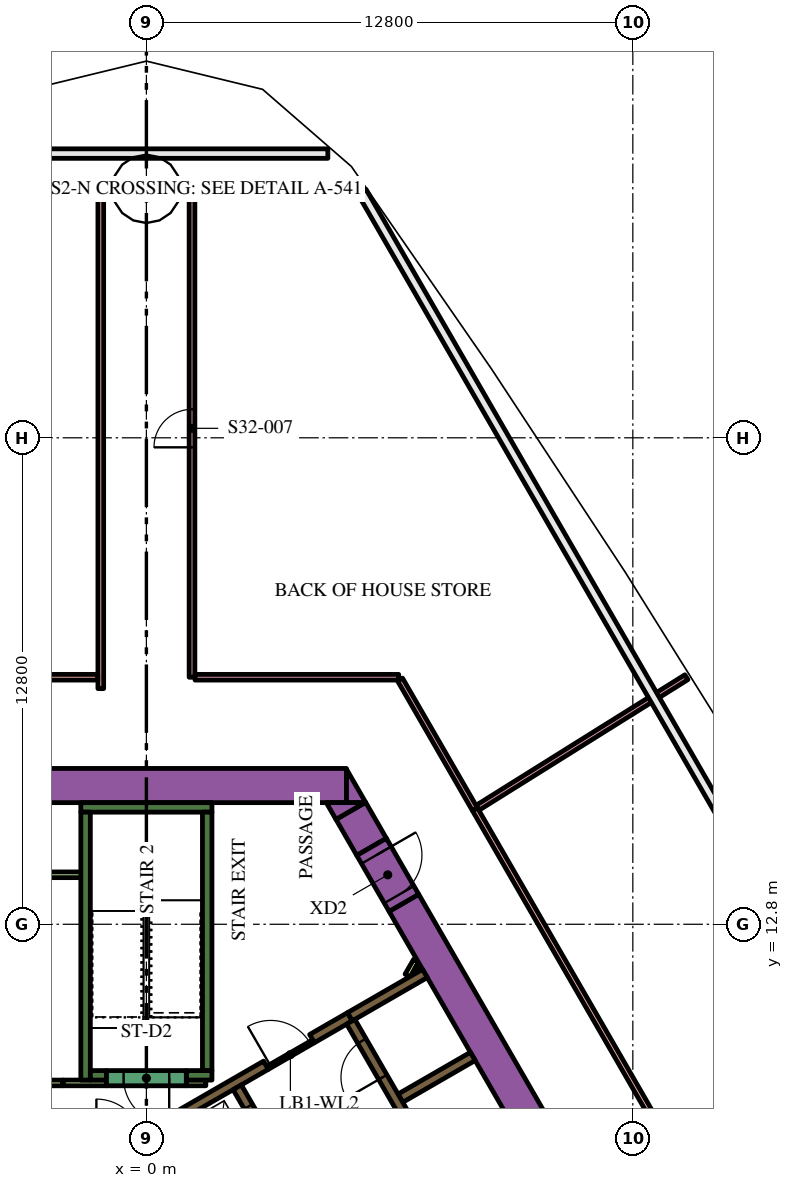
"""IFC4 building model, lengths in metres.
Left out: names, types, materials, properties, quantities, classifications, styles, units other than length and angle.
Written with IfcOpenShell. Run it as: python <this file> out.ifc"""

import sys

from ifc_helpers import new_model, si_unit, direction, frame, frame_2d, origin, place, context, subcontext, project, spatial, polyline, rectangle, outline, extrude, element, fill, save


model = new_model("IFC4")
c1 = context("Model", 3, precision=1e-05, world=origin(), true_north=direction((0.0, 1.0)))
c2 = subcontext(c1, "Body", "Model", "MODEL_VIEW")
j1 = project(units=[si_unit("LENGTHUNIT", "METRE"), si_unit("PLANEANGLEUNIT", "RADIAN")], contexts=[c1])
p1 = place(None, origin())
s1 = spatial("IfcSite", under=j1, at=p1, CompositionType="ELEMENT")
p2 = place(p1, origin())
s2 = spatial("IfcBuilding", under=s1, at=p2, CompositionType="ELEMENT")
p3 = place(p2, frame((0.0, 0.0, 134.4)))
s3 = spatial("IfcBuildingStorey", under=s2, at=p3, CompositionType="ELEMENT", Elevation=134.4)
p4 = place(p3, frame((6.776, 13.364, 0.0), z_axis=(0.0, 0.0, 1.0), x_axis=(0.500004177138, -0.8660229921, 0.0)))
e1 = element("IfcWall", 1, at=p4, inside=s3, PredefinedType="SOLIDWALL", context=c2, shape_type="SweptSolid", body=[
    extrude(rectangle(XDim=20.204, YDim=0.9, at=frame_2d((10.102, 0.0))), origin(), (0.0, 0.0, 1.0), 7.2),
])
p5 = place(p3, frame((-4.224, 16.45, 0.0), z_axis=(0.0, 0.0, 1.0), x_axis=(1.0, 0.0, 0.0)))
e2 = element("IfcWall", 2, at=p5, inside=s3, PredefinedType="SOLIDWALL", context=c2, shape_type="SweptSolid", body=[
    extrude(rectangle(XDim=9.488, YDim=0.9, at=frame_2d((4.744, 0.0))), origin(), (0.0, 0.0, 1.0), 7.2),
])
p6 = place(p3, origin())
e3 = element("IfcWall", 3, at=p6, inside=s3, PredefinedType="SOLIDWALL", context=c2, shape_type="SweptSolid", body=[
    extrude(outline(polyline([(5.265, 16.0), (5.265, 16.88), (5.773, 16.0), (5.265, 16.0)])), origin(), (0.0, 0.0, 1.0), 7.2),
])
p7 = place(p3, frame((5.926, 14.836, 0.0), z_axis=(0.0, 0.0, 1.0), x_axis=(-0.500076735116, 0.865981096212, 0.0)))
e4 = element("IfcWall", 4, at=p7, inside=s3, PredefinedType="SOLIDWALL", context=c2, shape_type="SweptSolid", body=[
    extrude(rectangle(XDim=1.094, YDim=0.9, at=frame_2d((0.547, 0.0))), origin(), (0.0, 0.0, 1.0), 7.2),
])
e5 = element("IfcWall", 5, at=p6, inside=s3, PredefinedType="SOLIDWALL", context=c2, shape_type="SweptSolid", body=[
    extrude(outline(polyline([(4.734, 16.0), (5.75, 16.0), (4.988, 15.56), (4.734, 16.0)])), origin(), (0.0, 0.0, 1.0), 7.2),
])
p8 = place(p3, frame((-1.725, 15.875, 0.0), z_axis=(0.0, 0.0, 1.0), x_axis=(1.0, 0.0, 0.0)))
e6 = element("IfcWall", 6, at=p8, inside=s3, PredefinedType="SOLIDWALL", context=c2, shape_type="SweptSolid", body=[
    extrude(rectangle(XDim=3.45, YDim=0.25, at=frame_2d((1.725, 0.0))), origin(), (0.0, 0.0, 1.0), 7.2),
])
p9 = place(p3, frame((1.6, 8.95, 0.0), z_axis=(0.0, 0.0, 1.0), x_axis=(0.0, 1.0, 0.0)))
e7 = element("IfcWall", 7, at=p9, inside=s3, PredefinedType="SOLIDWALL", context=c2, shape_type="SweptSolid", body=[
    extrude(rectangle(XDim=6.8, YDim=0.25, at=frame_2d((3.4, 0.0))), origin(), (0.0, 0.0, 1.0), 7.2),
])
p10 = place(p3, frame((1.05, 8.825, 0.0), z_axis=(0.0, 0.0, 1.0), x_axis=(1.0, 0.0, 0.0)))
e8 = element("IfcWall", 8, at=p10, inside=s3, PredefinedType="SOLIDWALL", context=c2, shape_type="SweptSolid", body=[
    extrude(rectangle(XDim=0.675, YDim=0.25, at=frame_2d((0.337, 0.0))), origin(), (0.0, 0.0, 1.0), 7.2),
])
p11 = place(p3, frame((-1.6, 8.7, 0.0), z_axis=(0.0, 0.0, 1.0), x_axis=(0.0, 1.0, 0.0)))
e9 = element("IfcWall", 9, at=p11, inside=s3, PredefinedType="SOLIDWALL", context=c2, shape_type="SweptSolid", body=[
    extrude(rectangle(XDim=7.05, YDim=0.25, at=frame_2d((3.525, 0.0))), origin(), (0.0, 0.0, 1.0), 7.2),
])
p12 = place(p3, frame((-1.475, 8.825, 0.0), z_axis=(0.0, 0.0, 1.0), x_axis=(1.0, 0.0, 0.0)))
e10 = element("IfcWall", 10, at=p12, inside=s3, PredefinedType="SOLIDWALL", context=c2, shape_type="SweptSolid", body=[
    extrude(rectangle(XDim=0.425, YDim=0.25, at=frame_2d((0.212, 0.0))), origin(), (0.0, 0.0, 1.0), 7.2),
])
p13 = place(p3, frame((4.358, 9.791, 0.0), z_axis=(0.0, 0.0, 1.0), x_axis=(0.866079547155, 0.499906209203, 0.0)))
e11 = element("IfcWall", 11, at=p13, inside=s3, PredefinedType="SOLIDWALL", context=c2, shape_type="SweptSolid", body=[
    extrude(rectangle(XDim=1.15, YDim=0.25, at=frame_2d((0.575, 0.0))), origin(), (0.0, 0.0, 1.0), 7.2),
])
p14 = place(p3, frame((5.356, 10.367, 0.0), z_axis=(0.0, 0.0, 1.0), x_axis=(0.865978535641, 0.50008116922, 0.0)))
e12 = element("IfcWall", 12, at=p14, inside=s3, PredefinedType="SOLIDWALL", context=c2, shape_type="SweptSolid", body=[
    extrude(rectangle(XDim=2.278, YDim=0.25, at=frame_2d((1.139, 0.0))), origin(), (0.0, 0.0, 1.0), 7.2),
])
p15 = place(p3, frame((0.314, 7.456, 0.0), z_axis=(0.0, 0.0, 1.0), x_axis=(0.866013897511, 0.50001992892, 0.0)))
e13 = element("IfcWall", 13, at=p15, inside=s3, PredefinedType="SOLIDWALL", context=c2, shape_type="SweptSolid", body=[
    extrude(rectangle(XDim=3.268, YDim=0.25, at=frame_2d((1.634, 0.0))), origin(), (0.0, 0.0, 1.0), 7.2),
])
p16 = place(p3, frame((6.684, 8.224, 0.0), z_axis=(0.0, 0.0, 1.0), x_axis=(0.86605622881, 0.499946605688, 0.0)))
e14 = element("IfcWall", 14, at=p16, inside=s3, PredefinedType="SOLIDWALL", context=c2, shape_type="SweptSolid", body=[
    extrude(rectangle(XDim=2.2, YDim=0.25, at=frame_2d((1.1, 0.0))), origin(), (0.0, 0.0, 1.0), 7.2),
])
p17 = place(p3, frame((-2.196, 8.625, 0.0), z_axis=(0.0, 0.0, 1.0), x_axis=(1.0, 0.0, 0.0)))
e15 = element("IfcWall", 15, at=p17, inside=s3, PredefinedType="PARTITIONING", context=c2, shape_type="SweptSolid", body=[
    extrude(rectangle(XDim=1.146, YDim=0.15, at=frame_2d((0.573, 0.0))), origin(), (0.0, 0.0, 1.0), 6.15),
])
p18 = place(p3, frame((1.05, 8.625, 0.0), z_axis=(0.0, 0.0, 1.0), x_axis=(1.0, 0.0, 0.0)))
e16 = element("IfcWall", 16, at=p18, inside=s3, PredefinedType="PARTITIONING", context=c2, shape_type="SweptSolid", body=[
    extrude(rectangle(XDim=0.514, YDim=0.15, at=frame_2d((0.257, 0.0))), origin(), (0.0, 0.0, 1.0), 6.15),
])
p19 = place(p3, frame((6.872, 11.45, 0.0), z_axis=(0.0, 0.0, 1.0), x_axis=(0.499846793097, 0.866113839764, 0.0)))
e17 = element("IfcWall", 17, at=p19, inside=s3, PredefinedType="PARTITIONING", context=c2, shape_type="SweptSolid", body=[
    extrude(rectangle(XDim=0.453, YDim=0.15, at=frame_2d((0.227, 0.0))), origin(), (0.0, 0.0, 1.0), 6.15),
])
p20 = place(p3, frame((7.131, 11.6, 0.0), z_axis=(0.0, 0.0, 1.0), x_axis=(0.498600033135, 0.866832167699, 0.0)))
e18 = element("IfcWall", 18, at=p20, inside=s3, PredefinedType="PARTITIONING", context=c2, shape_type="SweptSolid", body=[
    extrude(rectangle(XDim=0.107, YDim=0.15, at=frame_2d((0.053, 0.0))), origin(), (0.0, 0.0, 1.0), 6.15),
])
p21 = place(p3, frame((-2.871, 14.102, 0.0), z_axis=(0.0, 0.0, 1.0), x_axis=(1.0, 0.0, 0.0)))
e19 = element("IfcWall", 19, at=p21, inside=s3, PredefinedType="PARTITIONING", context=c2, shape_type="SweptSolid", body=[
    extrude(rectangle(XDim=1.196, YDim=0.15, at=frame_2d((0.598, 0.0))), origin(), (0.0, 0.0, 1.0), 6.15),
])
p22 = place(p3, frame((11.553, -0.46, 0.0), z_axis=(0.0, 0.0, 1.0), x_axis=(-0.500006514828, 0.866021642414, 0.0)))
e20 = element("IfcWall", 20, at=p22, inside=s3, PredefinedType="SOLIDWALL", context=c2, shape_type="SweptSolid", body=[
    extrude(rectangle(XDim=12.35, YDim=0.25, at=frame_2d((6.175, 0.0))), origin(), (0.0, 0.0, 1.0), 7.2),
])
p23 = place(p22, frame((0.585, 0.0, 0.0)))
e21 = element("IfcOpeningElement", 21, at=p23, cuts=e20, PredefinedType="OPENING", context=c2, shape_type="SweptSolid", body=[
    extrude(rectangle(XDim=1.1, YDim=2.1, at=frame_2d((0.55, 1.05))), frame((0.0, 0.135, 0.0), z_axis=(0.0, -1.0, 0.0), x_axis=(1.0, 0.0, 0.0)), (0.0, 0.0, 1.0), 0.27),
])
p24 = place(p22, frame((3.105, 0.0, 0.0)))
e22 = element("IfcOpeningElement", 22, at=p24, cuts=e20, PredefinedType="OPENING", context=c2, shape_type="SweptSolid", body=[
    extrude(rectangle(XDim=1.1, YDim=2.1, at=frame_2d((0.55, 1.05))), frame((0.0, 0.135, 0.0), z_axis=(0.0, -1.0, 0.0), x_axis=(1.0, 0.0, 0.0)), (0.0, 0.0, 1.0), 0.27),
])
p25 = place(p22, frame((5.625, 0.0, 0.0)))
e23 = element("IfcOpeningElement", 23, at=p25, cuts=e20, PredefinedType="OPENING", context=c2, shape_type="SweptSolid", body=[
    extrude(rectangle(XDim=1.1, YDim=2.1, at=frame_2d((0.55, 1.05))), frame((0.0, 0.135, 0.0), z_axis=(0.0, -1.0, 0.0), x_axis=(1.0, 0.0, 0.0)), (0.0, 0.0, 1.0), 0.27),
])
p26 = place(p22, frame((8.145, 0.0, 0.0)))
e24 = element("IfcOpeningElement", 24, at=p26, cuts=e20, PredefinedType="OPENING", context=c2, shape_type="SweptSolid", body=[
    extrude(rectangle(XDim=1.1, YDim=2.1, at=frame_2d((0.55, 1.05))), frame((0.0, 0.135, 0.0), z_axis=(0.0, -1.0, 0.0), x_axis=(1.0, 0.0, 0.0)), (0.0, 0.0, 1.0), 0.27),
])
p27 = place(p22, frame((10.665, 0.0, 0.0)))
e25 = element("IfcOpeningElement", 25, at=p27, cuts=e20, PredefinedType="OPENING", context=c2, shape_type="SweptSolid", body=[
    extrude(rectangle(XDim=1.1, YDim=2.1, at=frame_2d((0.55, 1.05))), frame((0.0, 0.135, 0.0), z_axis=(0.0, -1.0, 0.0), x_axis=(1.0, 0.0, 0.0)), (0.0, 0.0, 1.0), 0.27),
])
p28 = place(p3, frame((8.565, -2.185, 0.0), z_axis=(0.0, 0.0, 1.0), x_axis=(-0.499997954832, 0.866026584559, 0.0)))
e26 = element("IfcWall", 26, at=p28, inside=s3, PredefinedType="SOLIDWALL", context=c2, shape_type="SweptSolid", body=[
    extrude(rectangle(XDim=12.35, YDim=0.25, at=frame_2d((6.175, 0.0))), origin(), (0.0, 0.0, 1.0), 7.2),
])
p29 = place(p28, frame((0.585, 0.0, 0.0)))
e27 = element("IfcOpeningElement", 27, at=p29, cuts=e26, PredefinedType="OPENING", context=c2, shape_type="SweptSolid", body=[
    extrude(rectangle(XDim=1.1, YDim=2.1, at=frame_2d((0.55, 1.05))), frame((0.0, 0.135, 0.0), z_axis=(0.0, -1.0, 0.0), x_axis=(1.0, 0.0, 0.0)), (0.0, 0.0, 1.0), 0.27),
])
p30 = place(p28, frame((3.105, 0.0, 0.0)))
e28 = element("IfcOpeningElement", 28, at=p30, cuts=e26, PredefinedType="OPENING", context=c2, shape_type="SweptSolid", body=[
    extrude(rectangle(XDim=1.1, YDim=2.1, at=frame_2d((0.55, 1.05))), frame((0.0, 0.135, 0.0), z_axis=(0.0, -1.0, 0.0), x_axis=(1.0, 0.0, 0.0)), (0.0, 0.0, 1.0), 0.27),
])
p31 = place(p28, frame((5.625, 0.0, 0.0)))
e29 = element("IfcOpeningElement", 29, at=p31, cuts=e26, PredefinedType="OPENING", context=c2, shape_type="SweptSolid", body=[
    extrude(rectangle(XDim=1.1, YDim=2.1, at=frame_2d((0.55, 1.05))), frame((0.0, 0.135, 0.0), z_axis=(0.0, -1.0, 0.0), x_axis=(1.0, 0.0, 0.0)), (0.0, 0.0, 1.0), 0.27),
])
p32 = place(p28, frame((8.145, 0.0, 0.0)))
e30 = element("IfcOpeningElement", 30, at=p32, cuts=e26, PredefinedType="OPENING", context=c2, shape_type="SweptSolid", body=[
    extrude(rectangle(XDim=1.1, YDim=2.1, at=frame_2d((0.55, 1.05))), frame((0.0, 0.135, 0.0), z_axis=(0.0, -1.0, 0.0), x_axis=(1.0, 0.0, 0.0)), (0.0, 0.0, 1.0), 0.27),
])
p33 = place(p28, frame((10.665, 0.0, 0.0)))
e31 = element("IfcOpeningElement", 31, at=p33, cuts=e26, PredefinedType="OPENING", context=c2, shape_type="SweptSolid", body=[
    extrude(rectangle(XDim=1.1, YDim=2.1, at=frame_2d((0.55, 1.05))), frame((0.0, 0.135, 0.0), z_axis=(0.0, -1.0, 0.0), x_axis=(1.0, 0.0, 0.0)), (0.0, 0.0, 1.0), 0.27),
])
p34 = place(p3, frame((1.05, 8.75, 0.0), z_axis=(0.0, 0.0, 1.0), x_axis=(-1.0, 0.0, 0.0)))
e32 = element("IfcWall", 32, at=p34, inside=s3, PredefinedType="SOLIDWALL", context=c2, shape_type="SweptSolid", body=[
    extrude(rectangle(XDim=2.1, YDim=0.4, at=frame_2d((1.05, 0.0))), origin(), (0.0, 0.0, 1.0), 7.2),
])
p35 = place(p34, frame((0.45, 0.0, 0.0)))
e33 = element("IfcOpeningElement", 33, at=p35, cuts=e32, PredefinedType="OPENING", context=c2, shape_type="SweptSolid", body=[
    extrude(rectangle(XDim=1.2, YDim=2.1, at=frame_2d((0.6, 1.05))), frame((0.0, 0.21, 0.0), z_axis=(0.0, -1.0, 0.0), x_axis=(1.0, 0.0, 0.0)), (0.0, 0.0, 1.0), 0.42),
])
p36 = place(p3, frame((-2.196, 8.625, 0.0), z_axis=(0.0, 0.0, 1.0), x_axis=(-1.0, 0.0, 0.0)))
e34 = element("IfcWall", 34, at=p36, inside=s3, PredefinedType="PARTITIONING", context=c2, shape_type="SweptSolid", body=[
    extrude(rectangle(XDim=1.8, YDim=0.15, at=frame_2d((0.9, 0.0))), origin(), (0.0, 0.0, 1.0), 6.15),
])
p37 = place(p36, frame((0.45, 0.0, 0.0)))
e35 = element("IfcOpeningElement", 35, at=p37, cuts=e34, PredefinedType="OPENING", context=c2, shape_type="SweptSolid", body=[
    extrude(rectangle(XDim=0.9, YDim=2.1, at=frame_2d((0.45, 1.05))), frame((0.0, 0.085, 0.0), z_axis=(0.0, -1.0, 0.0), x_axis=(1.0, 0.0, 0.0)), (0.0, 0.0, 1.0), 0.17),
])
p38 = place(p3, frame((3.183, 9.02, 0.0), z_axis=(0.0, 0.0, 1.0), x_axis=(0.866034573852, 0.49998411664, 0.0)))
e36 = element("IfcWall", 36, at=p38, inside=s3, PredefinedType="PARTITIONING", context=c2, shape_type="SweptSolid", body=[
    extrude(rectangle(XDim=1.4, YDim=0.09, at=frame_2d((0.7, 0.0))), origin(), (0.0, 0.0, 1.0), 6.15),
])
p39 = place(p38, frame((0.1, 0.0, 0.0)))
e37 = element("IfcOpeningElement", 37, at=p39, cuts=e36, PredefinedType="OPENING", context=c2, shape_type="SweptSolid", body=[
    extrude(rectangle(XDim=1.2, YDim=2.1, at=frame_2d((0.6, 1.05))), frame((0.0, 0.055, 0.0), z_axis=(0.0, -1.0, 0.0), x_axis=(1.0, 0.0, 0.0)), (0.0, 0.0, 1.0), 0.11),
])
p40 = place(p3, frame((5.926, 14.836, 0.0), z_axis=(0.0, 0.0, 1.0), x_axis=(0.500062241894, -0.865989465428, 0.0)))
e38 = element("IfcWall", 38, at=p40, inside=s3, PredefinedType="SOLIDWALL", context=c2, shape_type="SweptSolid", body=[
    extrude(rectangle(XDim=1.7, YDim=0.9, at=frame_2d((0.85, 0.0))), origin(), (0.0, 0.0, 1.0), 7.2),
])
p41 = place(p40, frame((0.25, 0.0, 0.0)))
e39 = element("IfcOpeningElement", 39, at=p41, cuts=e38, PredefinedType="OPENING", context=c2, shape_type="SweptSolid", body=[
    extrude(rectangle(XDim=1.2, YDim=2.1, at=frame_2d((0.6, 1.05))), frame((0.0, 0.46, 0.0), z_axis=(0.0, -1.0, 0.0), x_axis=(1.0, 0.0, 0.0)), (0.0, 0.0, 1.0), 0.92),
])
p42 = place(p3, frame((20.034, -3.9, 0.0), z_axis=(0.0, 0.0, 1.0), x_axis=(-0.500006098403, 0.866021882841, 0.0)))
e40 = element("IfcWall", 40, at=p42, inside=s3, PredefinedType="PARTITIONING", context=c2, shape_type="SweptSolid", body=[
    extrude(rectangle(XDim=22.774, YDim=0.15, at=frame_2d((11.387, 0.0))), origin(), (0.0, 0.0, 1.0), 6.15),
])
p43 = place(p42, frame((10.487, 0.0, 0.0)))
e41 = element("IfcOpeningElement", 41, at=p43, cuts=e40, PredefinedType="OPENING", context=c2, shape_type="SweptSolid", body=[
    extrude(rectangle(XDim=1.8, YDim=2.1, at=frame_2d((0.9, 1.05))), frame((0.0, 0.085, 0.0), z_axis=(0.0, -1.0, 0.0), x_axis=(1.0, 0.0, 0.0)), (0.0, 0.0, 1.0), 0.17),
])
p44 = place(p42, frame((7.377, 0.0, 0.0)))
e42 = element("IfcOpeningElement", 42, at=p44, cuts=e40, PredefinedType="OPENING", context=c2, shape_type="SweptSolid", body=[
    extrude(rectangle(XDim=1.8, YDim=2.1, at=frame_2d((0.9, 1.05))), frame((0.0, 0.085, 0.0), z_axis=(0.0, -1.0, 0.0), x_axis=(1.0, 0.0, 0.0)), (0.0, 0.0, 1.0), 0.17),
])
p45 = place(p3, frame((1.2, 19.3, 0.0), z_axis=(0.0, 0.0, 1.0), x_axis=(0.0, 1.0, 0.0)))
e43 = element("IfcWall", 43, at=p45, inside=s3, PredefinedType="PARTITIONING", context=c2, shape_type="SweptSolid", body=[
    extrude(rectangle(XDim=13.098, YDim=0.15, at=frame_2d((6.549, 0.0))), origin(), (0.0, 0.0, 1.0), 6.15),
])
p46 = place(p45, frame((6.049, 0.0, 0.0)))
e44 = element("IfcOpeningElement", 44, at=p46, cuts=e43, PredefinedType="OPENING", context=c2, shape_type="SweptSolid", body=[
    extrude(rectangle(XDim=1.0, YDim=2.1, at=frame_2d((0.5, 1.05))), frame((0.0, 0.085, 0.0), z_axis=(0.0, -1.0, 0.0), x_axis=(1.0, 0.0, 0.0)), (0.0, 0.0, 1.0), 0.17),
])
p47 = place(p3, frame((-1.2, 19.0, 0.0), z_axis=(0.0, 0.0, 1.0), x_axis=(0.0, 1.0, 0.0)))
e45 = element("IfcWall", 45, at=p47, inside=s3, PredefinedType="PARTITIONING", context=c2, shape_type="SweptSolid", body=[
    extrude(rectangle(XDim=13.398, YDim=0.15, at=frame_2d((6.699, 0.0))), origin(), (0.0, 0.0, 1.0), 6.15),
])
p48 = place(p3, frame((8.715, 15.865, 0.0), z_axis=(0.0, 0.0, 1.0), x_axis=(0.847972904634, 0.53003957683, 0.0)))
e46 = element("IfcWall", 46, at=p48, inside=s3, PredefinedType="PARTITIONING", context=c2, shape_type="SweptSolid", body=[
    extrude(rectangle(XDim=6.48, YDim=0.15, at=frame_2d((3.24, 0.0))), origin(), (0.0, 0.0, 1.0), 6.15),
])
p49 = place(p3, frame((-6.57, 19.3, 0.0), z_axis=(0.0, 0.0, 1.0), x_axis=(1.0, 0.0, 0.0)))
e47 = element("IfcWall", 47, at=p49, inside=s3, PredefinedType="PARTITIONING", context=c2, shape_type="SweptSolid", body=[
    extrude(rectangle(XDim=5.29, YDim=0.15, at=frame_2d((2.645, 0.0))), origin(), (0.0, 0.0, 1.0), 6.15),
])
p50 = place(p3, frame((1.28, 19.3, 0.0), z_axis=(0.0, 0.0, 1.0), x_axis=(1.0, 0.0, 0.0)))
e48 = element("IfcWall", 48, at=p50, inside=s3, PredefinedType="PARTITIONING", context=c2, shape_type="SweptSolid", body=[
    extrude(rectangle(XDim=5.359, YDim=0.15, at=frame_2d((2.68, 0.0))), origin(), (0.0, 0.0, 1.0), 6.15),
])
p51 = place(p3, frame((6.675, 19.24, 0.0), z_axis=(0.0, 0.0, 1.0), x_axis=(0.499962322852, -0.866047155603, 0.0)))
e49 = element("IfcWall", 49, at=p51, inside=s3, PredefinedType="PARTITIONING", context=c2, shape_type="SweptSolid", body=[
    extrude(rectangle(XDim=3.935, YDim=0.15, at=frame_2d((1.968, 0.0))), origin(), (0.0, 0.0, 1.0), 6.15),
])
p52 = place(p27, origin())
e50 = element("IfcDoor", 50, at=p52, inside=s3, OperationType="DOUBLE_DOOR_SLIDING", PredefinedType="DOOR", context=c2, shape_type="SweptSolid", body=[
    extrude(rectangle(XDim=1.1, YDim=2.1, at=frame_2d((0.55, 1.05))), frame((0.0, 0.025, 0.0), z_axis=(0.0, -1.0, 0.0), x_axis=(1.0, 0.0, 0.0)), (0.0, 0.0, 1.0), 0.05),
])
fill(e25, e50)
p53 = place(p33, origin())
e51 = element("IfcDoor", 51, at=p53, inside=s3, OperationType="DOUBLE_DOOR_SLIDING", PredefinedType="DOOR", context=c2, shape_type="SweptSolid", body=[
    extrude(rectangle(XDim=1.1, YDim=2.1, at=frame_2d((0.55, 1.05))), frame((0.0, 0.025, 0.0), z_axis=(0.0, -1.0, 0.0), x_axis=(1.0, 0.0, 0.0)), (0.0, 0.0, 1.0), 0.05),
])
fill(e31, e51)
p54 = place(p35, origin())
e52 = element("IfcDoor", 52, at=p54, inside=s3, OperationType="SINGLE_SWING_LEFT", PredefinedType="DOOR", context=c2, shape_type="SweptSolid", body=[
    extrude(rectangle(XDim=1.2, YDim=2.1, at=frame_2d((0.6, 1.05))), frame((0.0, 0.025, 0.0), z_axis=(0.0, -1.0, 0.0), x_axis=(1.0, 0.0, 0.0)), (0.0, 0.0, 1.0), 0.05),
])
fill(e33, e52)
p55 = place(p39, origin())
e53 = element("IfcDoor", 53, at=p55, inside=s3, OperationType="SINGLE_SWING_LEFT", PredefinedType="DOOR", context=c2, shape_type="SweptSolid", body=[
    extrude(rectangle(XDim=1.2, YDim=2.1, at=frame_2d((0.6, 1.05))), frame((0.0, 0.025, 0.0), z_axis=(0.0, -1.0, 0.0), x_axis=(1.0, 0.0, 0.0)), (0.0, 0.0, 1.0), 0.05),
])
fill(e37, e53)
p56 = place(p41, origin())
e54 = element("IfcDoor", 54, at=p56, inside=s3, OperationType="SINGLE_SWING_LEFT", PredefinedType="DOOR", context=c2, shape_type="SweptSolid", body=[
    extrude(rectangle(XDim=1.2, YDim=2.1, at=frame_2d((0.6, 1.05))), frame((0.0, 0.025, 0.0), z_axis=(0.0, -1.0, 0.0), x_axis=(1.0, 0.0, 0.0)), (0.0, 0.0, 1.0), 0.05),
])
fill(e39, e54)
p57 = place(p46, origin())
e55 = element("IfcDoor", 55, at=p57, inside=s3, OperationType="SINGLE_SWING_RIGHT", PredefinedType="DOOR", context=c2, shape_type="SweptSolid", body=[
    extrude(rectangle(XDim=1.0, YDim=2.1, at=frame_2d((0.5, 1.05))), frame((0.0, 0.025, 0.0), z_axis=(0.0, -1.0, 0.0), x_axis=(1.0, 0.0, 0.0)), (0.0, 0.0, 1.0), 0.05),
])
fill(e44, e55)
save(model, sys.argv[1])
